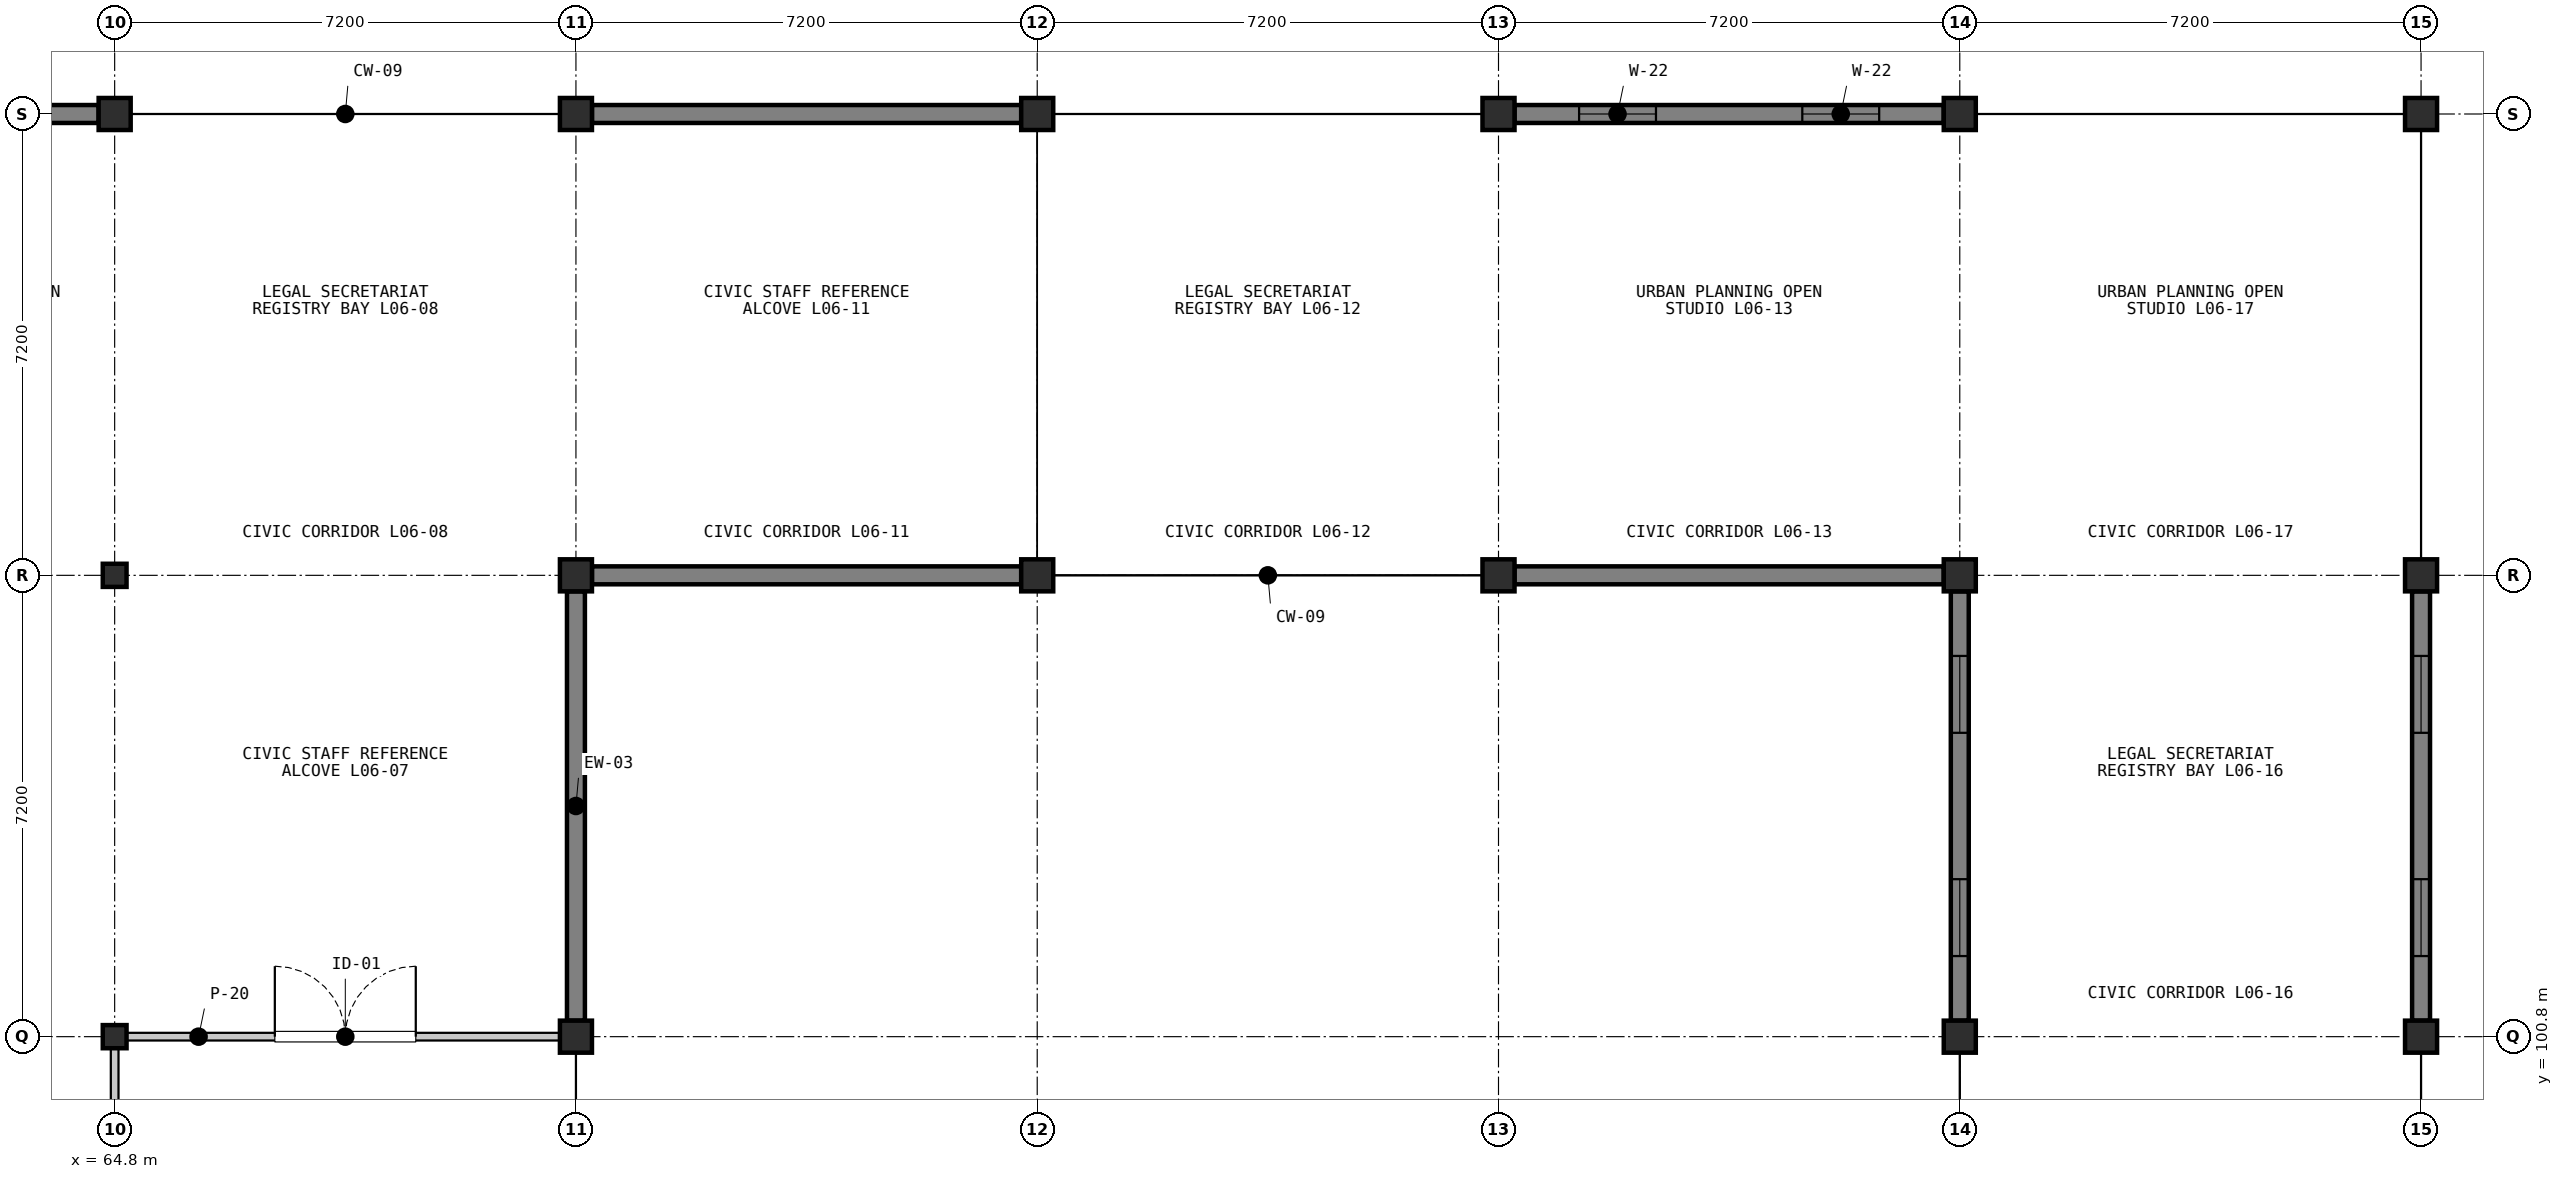
"""IFC4 building model, lengths in metres.
Left out: names, types, materials, properties, quantities, classifications, styles, units other than length and angle.
Written with IfcOpenShell. Run it as: python <this file> out.ifc"""

import sys

from ifc_helpers import new_model, si_unit, direction, frame, frame_2d, origin, origin_2d, place, context, subcontext, project, spatial, rectangle, i_section, extrude, element, fill, save


model = new_model("IFC4")
c1 = context("Model", 3, precision=1e-05, world=origin(), true_north=direction((0.0, 1.0)))
c2 = subcontext(c1, "Body", "Model", "MODEL_VIEW")
j1 = project(units=[si_unit("LENGTHUNIT", "METRE"), si_unit("PLANEANGLEUNIT", "RADIAN")], contexts=[c1])
p1 = place(None, origin())
s1 = spatial("IfcSite", under=j1, at=p1, CompositionType="ELEMENT")
p2 = place(p1, origin())
s2 = spatial("IfcBuilding", under=s1, at=p2, CompositionType="ELEMENT")
p3 = place(p2, frame((0.0, 0.0, 21.9)))
s3 = spatial("IfcBuildingStorey", under=s2, at=p3, CompositionType="ELEMENT", Elevation=21.9)
for number, where, z_axis, x_axis in (
    (1, (64.8, 100.8, 0.0), (0.0, 0.0, 1.0), (1.0, 0.0, 0.0)),
    (2, (64.8, 108.0, 0.0), (0.0, 0.0, 1.0), (1.0, 0.0, 0.0)),
):
    element("IfcColumn", number, at=place(p3, frame(where, z_axis=z_axis, x_axis=x_axis)), inside=s3, PredefinedType="COLUMN", context=c2, shape_type="SweptSolid", body=[
        extrude(i_section(OverallWidth=0.371, OverallDepth=0.361, WebThickness=0.012, FlangeThickness=0.02, FilletRadius=0.015, at=origin_2d()), origin(), (0.0, 0.0, 1.0), 3.9),
    ])
for number, where, z_axis, x_axis in (
    (3, (64.8, 115.2, 0.0), (0.0, 0.0, 1.0), (1.0, 0.0, 0.0)),
    (4, (72.0, 100.8, 0.0), (0.0, 0.0, 1.0), (1.0, 0.0, 0.0)),
    (5, (72.0, 108.0, 0.0), (0.0, 0.0, 1.0), (1.0, 0.0, 0.0)),
    (6, (72.0, 115.2, 0.0), (0.0, 0.0, 1.0), (1.0, 0.0, 0.0)),
    (7, (79.2, 108.0, 0.0), (0.0, 0.0, 1.0), (1.0, 0.0, 0.0)),
    (8, (79.2, 115.2, 0.0), (0.0, 0.0, 1.0), (1.0, 0.0, 0.0)),
    (9, (86.4, 108.0, 0.0), (0.0, 0.0, 1.0), (1.0, 0.0, 0.0)),
    (10, (86.4, 115.2, 0.0), (0.0, 0.0, 1.0), (1.0, 0.0, 0.0)),
    (11, (93.6, 100.8, 0.0), (0.0, 0.0, 1.0), (1.0, 0.0, 0.0)),
    (12, (93.6, 108.0, 0.0), (0.0, 0.0, 1.0), (1.0, 0.0, 0.0)),
    (13, (93.6, 115.2, 0.0), (0.0, 0.0, 1.0), (1.0, 0.0, 0.0)),
    (14, (100.8, 100.8, 0.0), (0.0, 0.0, 1.0), (1.0, 0.0, 0.0)),
    (15, (100.8, 108.0, 0.0), (0.0, 0.0, 1.0), (1.0, 0.0, 0.0)),
    (16, (100.8, 115.2, 0.0), (0.0, 0.0, 1.0), (1.0, 0.0, 0.0)),
):
    element("IfcColumn", number, at=place(p3, frame(where, z_axis=z_axis, x_axis=x_axis)), inside=s3, PredefinedType="COLUMN", context=c2, shape_type="SweptSolid", body=[
        extrude(rectangle(XDim=0.5, YDim=0.5, at=origin_2d()), origin(), (0.0, 0.0, 1.0), 3.9),
    ])
p4 = place(p3, frame((57.85, 115.2, 0.0), z_axis=(0.0, 0.0, 1.0), x_axis=(1.0, 0.0, 0.0)))
e17 = element("IfcWall", 17, at=p4, inside=s3, PredefinedType="SOLIDWALL", context=c2, shape_type="SweptSolid", body=[
    extrude(rectangle(XDim=6.7, YDim=0.28, at=frame_2d((3.35, 0.0))), origin(), (0.0, 0.0, 1.0), 3.192),
])
p5 = place(p4, frame((0.883, 0.0, 0.95)))
e18 = element("IfcOpeningElement", 18, at=p5, cuts=e17, PredefinedType="OPENING", context=c2, shape_type="SweptSolid", body=[
    extrude(rectangle(XDim=1.45, YDim=1.85, at=frame_2d((0.725, 0.925))), frame((0.0, 0.15, 0.0), z_axis=(0.0, -1.0, 0.0), x_axis=(1.0, 0.0, 0.0)), (0.0, 0.0, 1.0), 0.3),
])
p6 = place(p4, frame((4.367, 0.0, 0.95)))
e19 = element("IfcOpeningElement", 19, at=p6, cuts=e17, PredefinedType="OPENING", context=c2, shape_type="SweptSolid", body=[
    extrude(rectangle(XDim=1.45, YDim=1.85, at=frame_2d((0.725, 0.925))), frame((0.0, 0.15, 0.0), z_axis=(0.0, -1.0, 0.0), x_axis=(1.0, 0.0, 0.0)), (0.0, 0.0, 1.0), 0.3),
])
for number, where, z_axis, x_axis in (
    (20, (72.0, 107.75, 0.0), (0.0, 0.0, 1.0), (0.0, -1.0, 0.0)),
    (21, (78.95, 108.0, 0.0), (0.0, 0.0, 1.0), (-1.0, 0.0, 0.0)),
    (22, (72.25, 115.2, 0.0), (0.0, 0.0, 1.0), (1.0, 0.0, 0.0)),
):
    element("IfcWall", number, at=place(p3, frame(where, z_axis=z_axis, x_axis=x_axis)), inside=s3, PredefinedType="SOLIDWALL", context=c2, shape_type="SweptSolid", body=[
        extrude(rectangle(XDim=6.7, YDim=0.28, at=frame_2d((3.35, 0.0))), origin(), (0.0, 0.0, 1.0), 3.192),
    ])
p7 = place(p3, frame((93.35, 108.0, 0.0), z_axis=(0.0, 0.0, 1.0), x_axis=(-1.0, 0.0, 0.0)))
e23 = element("IfcWall", 23, at=p7, inside=s3, PredefinedType="SOLIDWALL", context=c2, shape_type="SweptSolid", body=[
    extrude(rectangle(XDim=6.7, YDim=0.28, at=frame_2d((3.35, 0.0))), origin(), (0.0, 0.0, 1.0), 3.192),
])
p8 = place(p3, frame((86.65, 115.2, 0.0), z_axis=(0.0, 0.0, 1.0), x_axis=(1.0, 0.0, 0.0)))
e24 = element("IfcWall", 24, at=p8, inside=s3, PredefinedType="SOLIDWALL", context=c2, shape_type="SweptSolid", body=[
    extrude(rectangle(XDim=6.7, YDim=0.28, at=frame_2d((3.35, 0.0))), origin(), (0.0, 0.0, 1.0), 3.192),
])
p9 = place(p8, frame((1.008, 0.0, 0.95)))
e25 = element("IfcOpeningElement", 25, at=p9, cuts=e24, PredefinedType="OPENING", context=c2, shape_type="SweptSolid", body=[
    extrude(rectangle(XDim=1.2, YDim=1.7, at=frame_2d((0.6, 0.85))), frame((0.0, 0.15, 0.0), z_axis=(0.0, -1.0, 0.0), x_axis=(1.0, 0.0, 0.0)), (0.0, 0.0, 1.0), 0.3),
])
p10 = place(p8, frame((4.492, 0.0, 0.95)))
e26 = element("IfcOpeningElement", 26, at=p10, cuts=e24, PredefinedType="OPENING", context=c2, shape_type="SweptSolid", body=[
    extrude(rectangle(XDim=1.2, YDim=1.7, at=frame_2d((0.6, 0.85))), frame((0.0, 0.15, 0.0), z_axis=(0.0, -1.0, 0.0), x_axis=(1.0, 0.0, 0.0)), (0.0, 0.0, 1.0), 0.3),
])
p11 = place(p3, frame((93.6, 101.05, 0.0), z_axis=(0.0, 0.0, 1.0), x_axis=(0.0, 1.0, 0.0)))
e27 = element("IfcWall", 27, at=p11, inside=s3, PredefinedType="SOLIDWALL", context=c2, shape_type="SweptSolid", body=[
    extrude(rectangle(XDim=6.7, YDim=0.28, at=frame_2d((3.35, 0.0))), origin(), (0.0, 0.0, 1.0), 3.192),
])
p12 = place(p11, frame((1.008, 0.0, 0.95)))
e28 = element("IfcOpeningElement", 28, at=p12, cuts=e27, PredefinedType="OPENING", context=c2, shape_type="SweptSolid", body=[
    extrude(rectangle(XDim=1.2, YDim=1.7, at=frame_2d((0.6, 0.85))), frame((0.0, 0.15, 0.0), z_axis=(0.0, -1.0, 0.0), x_axis=(1.0, 0.0, 0.0)), (0.0, 0.0, 1.0), 0.3),
])
p13 = place(p11, frame((4.492, 0.0, 0.95)))
e29 = element("IfcOpeningElement", 29, at=p13, cuts=e27, PredefinedType="OPENING", context=c2, shape_type="SweptSolid", body=[
    extrude(rectangle(XDim=1.2, YDim=1.7, at=frame_2d((0.6, 0.85))), frame((0.0, 0.15, 0.0), z_axis=(0.0, -1.0, 0.0), x_axis=(1.0, 0.0, 0.0)), (0.0, 0.0, 1.0), 0.3),
])
p14 = place(p3, frame((100.8, 107.75, 0.0), z_axis=(0.0, 0.0, 1.0), x_axis=(0.0, -1.0, 0.0)))
e30 = element("IfcWall", 30, at=p14, inside=s3, PredefinedType="SOLIDWALL", context=c2, shape_type="SweptSolid", body=[
    extrude(rectangle(XDim=6.7, YDim=0.28, at=frame_2d((3.35, 0.0))), origin(), (0.0, 0.0, 1.0), 3.192),
])
p15 = place(p14, frame((1.008, 0.0, 0.95)))
e31 = element("IfcOpeningElement", 31, at=p15, cuts=e30, PredefinedType="OPENING", context=c2, shape_type="SweptSolid", body=[
    extrude(rectangle(XDim=1.2, YDim=1.7, at=frame_2d((0.6, 0.85))), frame((0.0, 0.15, 0.0), z_axis=(0.0, -1.0, 0.0), x_axis=(1.0, 0.0, 0.0)), (0.0, 0.0, 1.0), 0.3),
])
p16 = place(p14, frame((4.492, 0.0, 0.95)))
e32 = element("IfcOpeningElement", 32, at=p16, cuts=e30, PredefinedType="OPENING", context=c2, shape_type="SweptSolid", body=[
    extrude(rectangle(XDim=1.2, YDim=1.7, at=frame_2d((0.6, 0.85))), frame((0.0, 0.15, 0.0), z_axis=(0.0, -1.0, 0.0), x_axis=(1.0, 0.0, 0.0)), (0.0, 0.0, 1.0), 0.3),
])
p17 = place(p3, frame((64.92, 100.8, 0.0), z_axis=(0.0, 0.0, 1.0), x_axis=(1.0, 0.0, 0.0)))
e33 = element("IfcWall", 33, at=p17, inside=s3, PredefinedType="PARTITIONING", context=c2, shape_type="SweptSolid", body=[
    extrude(rectangle(XDim=6.96, YDim=0.12, at=frame_2d((3.48, 0.0))), origin(), (0.0, 0.0, 1.0), 3.108),
])
p18 = place(p17, frame((2.38, 0.0, 0.0)))
e34 = element("IfcOpeningElement", 34, at=p18, cuts=e33, PredefinedType="OPENING", context=c2, shape_type="SweptSolid", body=[
    extrude(rectangle(XDim=2.2, YDim=2.6, at=frame_2d((1.1, 1.3))), frame((0.0, 0.07, 0.0), z_axis=(0.0, -1.0, 0.0), x_axis=(1.0, 0.0, 0.0)), (0.0, 0.0, 1.0), 0.14),
])
p19 = place(p3, frame((64.8, 93.72, 0.0), z_axis=(0.0, 0.0, 1.0), x_axis=(0.0, 1.0, 0.0)))
e35 = element("IfcWall", 35, at=p19, inside=s3, PredefinedType="PARTITIONING", context=c2, shape_type="SweptSolid", body=[
    extrude(rectangle(XDim=6.96, YDim=0.12, at=frame_2d((3.48, 0.0))), origin(), (0.0, 0.0, 1.0), 3.108),
])
p20 = place(p9, origin())
e36 = element("IfcWindow", 36, at=p20, inside=s3, PartitioningType="SINGLE_PANEL", PredefinedType="WINDOW", context=c2, shape_type="SweptSolid", body=[
    extrude(rectangle(XDim=1.2, YDim=1.7, at=frame_2d((0.6, 0.85))), frame((0.0, 0.03, 0.0), z_axis=(0.0, -1.0, 0.0), x_axis=(1.0, 0.0, 0.0)), (0.0, 0.0, 1.0), 0.06),
])
fill(e25, e36)
p21 = place(p10, origin())
e37 = element("IfcWindow", 37, at=p21, inside=s3, PartitioningType="SINGLE_PANEL", PredefinedType="WINDOW", context=c2, shape_type="SweptSolid", body=[
    extrude(rectangle(XDim=1.2, YDim=1.7, at=frame_2d((0.6, 0.85))), frame((0.0, 0.03, 0.0), z_axis=(0.0, -1.0, 0.0), x_axis=(1.0, 0.0, 0.0)), (0.0, 0.0, 1.0), 0.06),
])
fill(e26, e37)
p22 = place(p12, origin())
e38 = element("IfcWindow", 38, at=p22, inside=s3, PartitioningType="SINGLE_PANEL", PredefinedType="WINDOW", context=c2, shape_type="SweptSolid", body=[
    extrude(rectangle(XDim=1.2, YDim=1.7, at=frame_2d((0.6, 0.85))), frame((0.0, 0.03, 0.0), z_axis=(0.0, -1.0, 0.0), x_axis=(1.0, 0.0, 0.0)), (0.0, 0.0, 1.0), 0.06),
])
fill(e28, e38)
p23 = place(p13, origin())
e39 = element("IfcWindow", 39, at=p23, inside=s3, PartitioningType="SINGLE_PANEL", PredefinedType="WINDOW", context=c2, shape_type="SweptSolid", body=[
    extrude(rectangle(XDim=1.2, YDim=1.7, at=frame_2d((0.6, 0.85))), frame((0.0, 0.03, 0.0), z_axis=(0.0, -1.0, 0.0), x_axis=(1.0, 0.0, 0.0)), (0.0, 0.0, 1.0), 0.06),
])
fill(e29, e39)
p24 = place(p15, origin())
e40 = element("IfcWindow", 40, at=p24, inside=s3, PartitioningType="SINGLE_PANEL", PredefinedType="WINDOW", context=c2, shape_type="SweptSolid", body=[
    extrude(rectangle(XDim=1.2, YDim=1.7, at=frame_2d((0.6, 0.85))), frame((0.0, 0.03, 0.0), z_axis=(0.0, -1.0, 0.0), x_axis=(1.0, 0.0, 0.0)), (0.0, 0.0, 1.0), 0.06),
])
fill(e31, e40)
p25 = place(p16, origin())
e41 = element("IfcWindow", 41, at=p25, inside=s3, PartitioningType="SINGLE_PANEL", PredefinedType="WINDOW", context=c2, shape_type="SweptSolid", body=[
    extrude(rectangle(XDim=1.2, YDim=1.7, at=frame_2d((0.6, 0.85))), frame((0.0, 0.03, 0.0), z_axis=(0.0, -1.0, 0.0), x_axis=(1.0, 0.0, 0.0)), (0.0, 0.0, 1.0), 0.06),
])
fill(e32, e41)
p26 = place(p18, origin())
e42 = element("IfcDoor", 42, at=p26, inside=s3, OperationType="DOUBLE_DOOR_SINGLE_SWING", PredefinedType="DOOR", context=c2, shape_type="SweptSolid", body=[
    extrude(rectangle(XDim=2.2, YDim=2.6, at=frame_2d((1.1, 1.3))), frame((0.0, 0.025, 0.0), z_axis=(0.0, -1.0, 0.0), x_axis=(1.0, 0.0, 0.0)), (0.0, 0.0, 1.0), 0.05),
])
fill(e34, e42)
save(model, sys.argv[1])
